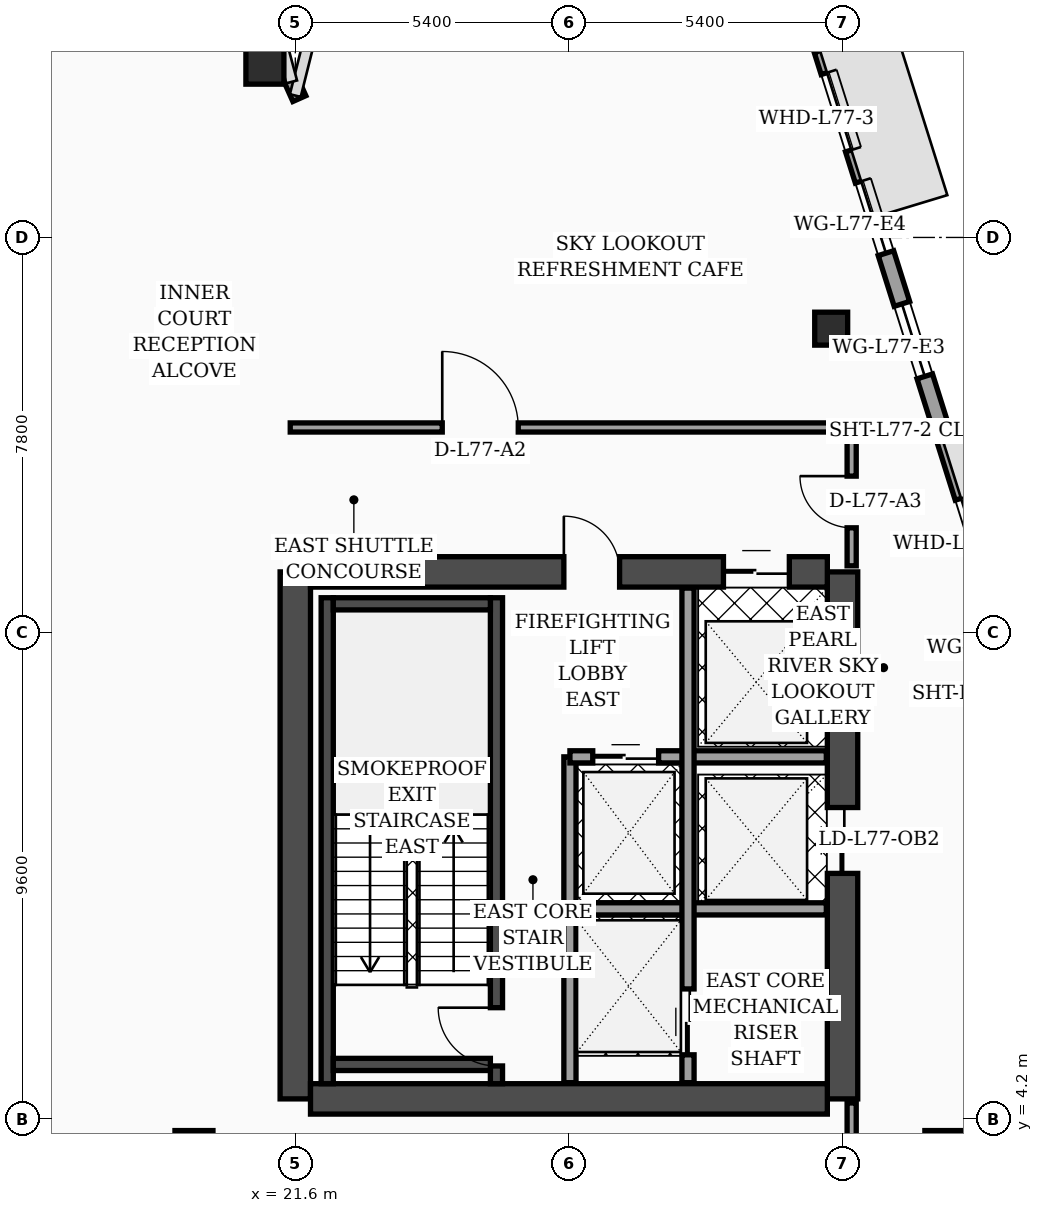
"""IFC4 building model, lengths in metres.
Left out: names, types, materials, properties, quantities, classifications, styles, units other than length and angle.
Written with IfcOpenShell. Run it as: python <this file> out.ifc"""

import sys

from ifc_helpers import new_model, si_unit, direction, frame, frame_2d, origin, origin_2d, place, context, subcontext, project, spatial, rectangle, hollow_rectangle, extrude, element, fill, save


model = new_model("IFC4")
c1 = context("Model", 3, precision=1e-05, world=origin(), true_north=direction((0.0, 1.0)))
c2 = subcontext(c1, "Body", "Model", "MODEL_VIEW")
j1 = project(units=[si_unit("LENGTHUNIT", "METRE"), si_unit("PLANEANGLEUNIT", "RADIAN")], contexts=[c1])
p1 = place(None, origin())
s1 = spatial("IfcSite", under=j1, at=p1, CompositionType="ELEMENT")
p2 = place(p1, origin())
s2 = spatial("IfcBuilding", under=s1, at=p2, CompositionType="ELEMENT")
p3 = place(p2, frame((0.0, 0.0, 311.5)))
s3 = spatial("IfcBuildingStorey", under=s2, at=p3, CompositionType="ELEMENT", Elevation=311.5)
p4 = place(p3, frame((21.6, 4.6, 0.0), z_axis=(0.0, 0.0, 1.0), x_axis=(0.0, 1.0, 0.0)))
e1 = element("IfcWall", 1, at=p4, inside=s3, PredefinedType="SHEAR", context=c2, shape_type="SweptSolid", body=[
    extrude(rectangle(XDim=10.4, YDim=0.6, at=frame_2d((5.2, 0.0))), origin(), (0.0, 0.0, 1.0), 4.26),
])
p5 = place(p3, frame((32.4, 4.6, 0.0), z_axis=(0.0, 0.0, 1.0), x_axis=(0.0, 1.0, 0.0)))
e2 = element("IfcWall", 2, at=p5, inside=s3, PredefinedType="SHEAR", context=c2, shape_type="SweptSolid", body=[
    extrude(rectangle(XDim=10.4, YDim=0.6, at=frame_2d((5.2, 0.0))), origin(), (0.0, 0.0, 1.0), 4.26),
])
p6 = place(p5, frame((4.45, 0.0, 0.0)))
e3 = element("IfcOpeningElement", 3, at=p6, cuts=e2, PredefinedType="OPENING", context=c2, shape_type="SweptSolid", body=[
    extrude(rectangle(XDim=1.3, YDim=2.35, at=frame_2d((0.65, 1.175))), frame((0.0, 0.31, 0.0), z_axis=(0.0, -1.0, 0.0), x_axis=(1.0, 0.0, 0.0)), (0.0, 0.0, 1.0), 0.62),
])
p7 = place(p3, frame((21.9, 15.0, 0.0), z_axis=(0.0, 0.0, 1.0), x_axis=(1.0, 0.0, 0.0)))
e4 = element("IfcWall", 4, at=p7, inside=s3, PredefinedType="SHEAR", context=c2, shape_type="SweptSolid", body=[
    extrude(rectangle(XDim=10.2, YDim=0.6, at=frame_2d((5.1, 0.0))), origin(), (0.0, 0.0, 1.0), 4.26),
])
p8 = place(p7, frame((5.0, 0.0, 0.0)))
e5 = element("IfcOpeningElement", 5, at=p8, cuts=e4, PredefinedType="OPENING", context=c2, shape_type="SweptSolid", body=[
    extrude(rectangle(XDim=1.1, YDim=2.2, at=frame_2d((0.55, 1.1))), frame((0.0, 0.31, 0.0), z_axis=(0.0, -1.0, 0.0), x_axis=(1.0, 0.0, 0.0)), (0.0, 0.0, 1.0), 0.62),
])
p9 = place(p7, frame((8.15, 0.0, 0.0)))
e6 = element("IfcOpeningElement", 6, at=p9, cuts=e4, PredefinedType="OPENING", context=c2, shape_type="SweptSolid", body=[
    extrude(rectangle(XDim=1.3, YDim=2.35, at=frame_2d((0.65, 1.175))), frame((0.0, 0.31, 0.0), z_axis=(0.0, -1.0, 0.0), x_axis=(1.0, 0.0, 0.0)), (0.0, 0.0, 1.0), 0.62),
])
p10 = place(p3, frame((21.9, 4.6, 0.0), z_axis=(0.0, 0.0, 1.0), x_axis=(1.0, 0.0, 0.0)))
e7 = element("IfcWall", 7, at=p10, inside=s3, PredefinedType="SHEAR", context=c2, shape_type="SweptSolid", body=[
    extrude(rectangle(XDim=10.2, YDim=0.6, at=frame_2d((5.1, 0.0))), origin(), (0.0, 0.0, 1.0), 4.26),
])
p11 = place(p3, frame((22.23, 4.9, 0.0), z_axis=(0.0, 0.0, 1.0), x_axis=(0.0, 1.0, 0.0)))
e8 = element("IfcWall", 8, at=p11, inside=s3, PredefinedType="SOLIDWALL", context=c2, shape_type="SweptSolid", body=[
    extrude(rectangle(XDim=9.59, YDim=0.24, at=frame_2d((4.795, 0.0))), origin(), (0.0, 0.0, 1.0), 4.26),
])
p12 = place(p3, frame((25.57, 4.9, 0.0), z_axis=(0.0, 0.0, 1.0), x_axis=(0.0, 1.0, 0.0)))
e9 = element("IfcWall", 9, at=p12, inside=s3, PredefinedType="SOLIDWALL", context=c2, shape_type="SweptSolid", body=[
    extrude(rectangle(XDim=9.59, YDim=0.24, at=frame_2d((4.795, 0.0))), origin(), (0.0, 0.0, 1.0), 4.26),
])
p13 = place(p12, frame((0.35, 0.0, 0.0)))
e10 = element("IfcOpeningElement", 10, at=p13, cuts=e9, PredefinedType="OPENING", context=c2, shape_type="SweptSolid", body=[
    extrude(rectangle(XDim=1.15, YDim=2.2, at=frame_2d((0.575, 1.1))), frame((0.0, 0.13, 0.0), z_axis=(0.0, -1.0, 0.0), x_axis=(1.0, 0.0, 0.0)), (0.0, 0.0, 1.0), 0.26),
])
for number, where, z_axis, x_axis in (
    (11, (22.35, 5.28, 0.0), (0.0, 0.0, 1.0), (1.0, 0.0, 0.0)),
    (12, (22.35, 14.37, 0.0), (0.0, 0.0, 1.0), (1.0, 0.0, 0.0)),
):
    element("IfcWall", number, at=place(p3, frame(where, z_axis=z_axis, x_axis=x_axis)), inside=s3, PredefinedType="SOLIDWALL", context=c2, shape_type="SweptSolid", body=[
        extrude(rectangle(XDim=3.1, YDim=0.24, at=frame_2d((1.55, 0.0))), origin(), (0.0, 0.0, 1.0), 4.26),
    ])
for number, where, z_axis, x_axis in (
    (13, (21.0, 25.0, 0.0), (0.0, 0.0, 1.0), (1.0, 0.0, 0.0)),
    (14, (19.6, 3.6, 0.0), (0.0, 0.0, 1.0), (1.0, 0.0, 0.0)),
    (15, (34.4, 3.6, 0.0), (0.0, 0.0, 1.0), (1.0, 0.0, 0.0)),
):
    element("IfcColumn", number, at=place(p3, frame(where, z_axis=z_axis, x_axis=x_axis)), inside=s3, PredefinedType="COLUMN", context=c2, shape_type="SweptSolid", body=[
        extrude(hollow_rectangle(XDim=0.75, YDim=0.75, WallThickness=0.032, at=origin_2d()), origin(), (0.0, 0.0, 1.0), 4.26),
    ])
p14 = place(p3, frame((32.176, 19.8, 0.0), z_axis=(0.0, 0.0, 1.0), x_axis=(1.0, 0.0, 0.0)))
e16 = element("IfcColumn", 16, at=p14, inside=s3, PredefinedType="COLUMN", context=c2, shape_type="SweptSolid", body=[
    extrude(hollow_rectangle(XDim=0.65, YDim=0.65, WallThickness=0.028, at=origin_2d()), origin(), (0.0, 0.0, 1.0), 4.26),
])
p15 = place(p3, frame((21.68, 24.34, 0.0), z_axis=(0.0, 0.0, 1.0), x_axis=(-0.40758134973, 0.913168901875, 0.0)))
e17 = element("IfcWall", 17, at=p15, inside=s3, PredefinedType="SOLIDWALL", context=c2, shape_type="SweptSolid", body=[
    extrude(rectangle(XDim=0.471, YDim=0.28, at=frame_2d((0.235, 0.0))), origin(), (0.0, 0.0, 1.0), 4.26),
])
p16 = place(p3, frame((38.23, 5.505, 0.0), z_axis=(0.0, 0.0, 1.0), x_axis=(-0.300509063924, 0.953778958931, 0.0)))
e18 = element("IfcWall", 18, at=p16, inside=s3, PredefinedType="SOLIDWALL", context=c2, shape_type="SweptSolid", body=[
    extrude(rectangle(XDim=30.814, YDim=0.32, at=frame_2d((15.407, 0.0))), origin(), (0.0, 0.0, 1.0), 4.26),
])
p17 = place(p16, frame((4.437, 0.0, 0.7)))
e19 = element("IfcOpeningElement", 19, at=p17, cuts=e18, PredefinedType="OPENING", context=c2, shape_type="SweptSolid", body=[
    extrude(rectangle(XDim=1.6, YDim=1.65, at=frame_2d((0.8, 0.825))), frame((0.0, 0.17, 0.0), z_axis=(0.0, -1.0, 0.0), x_axis=(1.0, 0.0, 0.0)), (0.0, 0.0, 1.0), 0.34),
])
p18 = place(p16, frame((9.889, 0.0, 0.7)))
e20 = element("IfcOpeningElement", 20, at=p18, cuts=e18, PredefinedType="OPENING", context=c2, shape_type="SweptSolid", body=[
    extrude(rectangle(XDim=1.6, YDim=1.65, at=frame_2d((0.8, 0.825))), frame((0.0, 0.17, 0.0), z_axis=(0.0, -1.0, 0.0), x_axis=(1.0, 0.0, 0.0)), (0.0, 0.0, 1.0), 0.34),
])
p19 = place(p16, frame((18.696, 0.0, 0.7)))
e21 = element("IfcOpeningElement", 21, at=p19, cuts=e18, PredefinedType="OPENING", context=c2, shape_type="SweptSolid", body=[
    extrude(rectangle(XDim=1.6, YDim=1.65, at=frame_2d((0.8, 0.825))), frame((0.0, 0.17, 0.0), z_axis=(0.0, -1.0, 0.0), x_axis=(1.0, 0.0, 0.0)), (0.0, 0.0, 1.0), 0.34),
])
p20 = place(p16, frame((1.6, 0.0, 0.75)))
e22 = element("IfcOpeningElement", 22, at=p20, cuts=e18, PredefinedType="OPENING", context=c2, shape_type="SweptSolid", body=[
    extrude(rectangle(XDim=1.5, YDim=1.6, at=frame_2d((0.75, 0.8))), frame((0.0, 0.17, 0.0), z_axis=(0.0, -1.0, 0.0), x_axis=(1.0, 0.0, 0.0)), (0.0, 0.0, 1.0), 0.34),
])
p21 = place(p16, frame((7.8, 0.0, 0.75)))
e23 = element("IfcOpeningElement", 23, at=p21, cuts=e18, PredefinedType="OPENING", context=c2, shape_type="SweptSolid", body=[
    extrude(rectangle(XDim=1.5, YDim=1.6, at=frame_2d((0.75, 0.8))), frame((0.0, 0.17, 0.0), z_axis=(0.0, -1.0, 0.0), x_axis=(1.0, 0.0, 0.0)), (0.0, 0.0, 1.0), 0.34),
])
p22 = place(p16, frame((14.0, 0.0, 0.75)))
e24 = element("IfcOpeningElement", 24, at=p22, cuts=e18, PredefinedType="OPENING", context=c2, shape_type="SweptSolid", body=[
    extrude(rectangle(XDim=1.5, YDim=1.6, at=frame_2d((0.75, 0.8))), frame((0.0, 0.17, 0.0), z_axis=(0.0, -1.0, 0.0), x_axis=(1.0, 0.0, 0.0)), (0.0, 0.0, 1.0), 0.34),
])
p23 = place(p16, frame((16.55, 0.0, 0.75)))
e25 = element("IfcOpeningElement", 25, at=p23, cuts=e18, PredefinedType="OPENING", context=c2, shape_type="SweptSolid", body=[
    extrude(rectangle(XDim=1.5, YDim=1.6, at=frame_2d((0.75, 0.8))), frame((0.0, 0.17, 0.0), z_axis=(0.0, -1.0, 0.0), x_axis=(1.0, 0.0, 0.0)), (0.0, 0.0, 1.0), 0.34),
])
p24 = place(p16, frame((20.75, 0.0, 0.75)))
e26 = element("IfcOpeningElement", 26, at=p24, cuts=e18, PredefinedType="OPENING", context=c2, shape_type="SweptSolid", body=[
    extrude(rectangle(XDim=1.5, YDim=1.6, at=frame_2d((0.75, 0.8))), frame((0.0, 0.17, 0.0), z_axis=(0.0, -1.0, 0.0), x_axis=(1.0, 0.0, 0.0)), (0.0, 0.0, 1.0), 0.34),
])
p25 = place(p16, frame((23.3, 0.0, 0.75)))
e27 = element("IfcOpeningElement", 27, at=p25, cuts=e18, PredefinedType="OPENING", context=c2, shape_type="SweptSolid", body=[
    extrude(rectangle(XDim=1.5, YDim=1.6, at=frame_2d((0.75, 0.8))), frame((0.0, 0.17, 0.0), z_axis=(0.0, -1.0, 0.0), x_axis=(1.0, 0.0, 0.0)), (0.0, 0.0, 1.0), 0.34),
])
p26 = place(p16, frame((26.4, 0.0, 0.75)))
e28 = element("IfcOpeningElement", 28, at=p26, cuts=e18, PredefinedType="OPENING", context=c2, shape_type="SweptSolid", body=[
    extrude(rectangle(XDim=1.5, YDim=1.6, at=frame_2d((0.75, 0.8))), frame((0.0, 0.17, 0.0), z_axis=(0.0, -1.0, 0.0), x_axis=(1.0, 0.0, 0.0)), (0.0, 0.0, 1.0), 0.34),
])
p27 = place(p3, frame((27.02, 4.92, 0.0), z_axis=(0.0, 0.0, 1.0), x_axis=(0.0, 1.0, 0.0)))
e29 = element("IfcWall", 29, at=p27, inside=s3, PredefinedType="SOLIDWALL", context=c2, shape_type="SweptSolid", body=[
    extrude(rectangle(XDim=6.43, YDim=0.24, at=frame_2d((3.215, 0.0))), origin(), (0.0, 0.0, 1.0), 4.26),
])
p28 = place(p3, frame((27.02, 11.35, 0.0), z_axis=(0.0, 0.0, 1.0), x_axis=(1.0, 0.0, 0.0)))
e30 = element("IfcWall", 30, at=p28, inside=s3, PredefinedType="SOLIDWALL", context=c2, shape_type="SweptSolid", body=[
    extrude(rectangle(XDim=5.06, YDim=0.24, at=frame_2d((2.53, 0.0))), origin(), (0.0, 0.0, 1.0), 4.26),
])
p29 = place(p28, frame((0.45, 0.0, 0.0)))
e31 = element("IfcOpeningElement", 31, at=p29, cuts=e30, PredefinedType="OPENING", context=c2, shape_type="SweptSolid", body=[
    extrude(rectangle(XDim=1.3, YDim=2.35, at=frame_2d((0.65, 1.175))), frame((0.0, 0.13, 0.0), z_axis=(0.0, -1.0, 0.0), x_axis=(1.0, 0.0, 0.0)), (0.0, 0.0, 1.0), 0.26),
])
p30 = place(p3, frame((27.02, 8.35, 0.0), z_axis=(0.0, 0.0, 1.0), x_axis=(1.0, 0.0, 0.0)))
e32 = element("IfcWall", 32, at=p30, inside=s3, PredefinedType="SOLIDWALL", context=c2, shape_type="SweptSolid", body=[
    extrude(rectangle(XDim=5.06, YDim=0.24, at=frame_2d((2.53, 0.0))), origin(), (0.0, 0.0, 1.0), 4.26),
])
p31 = place(p3, frame((29.35, 4.92, 0.0), z_axis=(0.0, 0.0, 1.0), x_axis=(0.0, 1.0, 0.0)))
e33 = element("IfcWall", 33, at=p31, inside=s3, PredefinedType="SOLIDWALL", context=c2, shape_type="SweptSolid", body=[
    extrude(rectangle(XDim=9.76, YDim=0.24, at=frame_2d((4.88, 0.0))), origin(), (0.0, 0.0, 1.0), 4.26),
])
p32 = place(p31, frame((0.55, 0.0, 0.0)))
e34 = element("IfcOpeningElement", 34, at=p32, cuts=e33, PredefinedType="OPENING", context=c2, shape_type="SweptSolid", body=[
    extrude(rectangle(XDim=1.3, YDim=2.35, at=frame_2d((0.65, 1.175))), frame((0.0, 0.13, 0.0), z_axis=(0.0, -1.0, 0.0), x_axis=(1.0, 0.0, 0.0)), (0.0, 0.0, 1.0), 0.26),
])
p33 = place(p3, frame((21.5, 17.85, 0.0), z_axis=(0.0, 0.0, 1.0), x_axis=(1.0, 0.0, 0.0)))
e35 = element("IfcWall", 35, at=p33, inside=s3, PredefinedType="PARTITIONING", context=c2, shape_type="SweptSolid", body=[
    extrude(rectangle(XDim=12.78, YDim=0.18, at=frame_2d((6.39, 0.0))), origin(), (0.0, 0.0, 1.0), 3.69),
])
p34 = place(p33, frame((3.0, 0.0, 0.0)))
e36 = element("IfcOpeningElement", 36, at=p34, cuts=e35, PredefinedType="OPENING", context=c2, shape_type="SweptSolid", body=[
    extrude(rectangle(XDim=1.5, YDim=2.22, at=frame_2d((0.75, 1.11))), frame((0.0, 0.1, 0.0), z_axis=(0.0, -1.0, 0.0), x_axis=(1.0, 0.0, 0.0)), (0.0, 0.0, 1.0), 0.2),
])
p35 = place(p3, frame((32.58, 15.12, 0.0), z_axis=(0.0, 0.0, 1.0), x_axis=(0.0, 1.0, 0.0)))
e37 = element("IfcWall", 37, at=p35, inside=s3, PredefinedType="PARTITIONING", context=c2, shape_type="SweptSolid", body=[
    extrude(rectangle(XDim=2.66, YDim=0.18, at=frame_2d((1.33, 0.0))), origin(), (0.0, 0.0, 1.0), 3.69),
])
p36 = place(p35, frame((0.75, 0.0, 0.0)))
e38 = element("IfcOpeningElement", 38, at=p36, cuts=e37, PredefinedType="OPENING", context=c2, shape_type="SweptSolid", body=[
    extrude(rectangle(XDim=1.02, YDim=2.2, at=frame_2d((0.51, 1.1))), frame((0.0, 0.1, 0.0), z_axis=(0.0, -1.0, 0.0), x_axis=(1.0, 0.0, 0.0)), (0.0, 0.0, 1.0), 0.2),
])
p37 = place(p3, frame((32.58, 2.6, 0.0), z_axis=(0.0, 0.0, 1.0), x_axis=(0.0, 1.0, 0.0)))
e39 = element("IfcWall", 39, at=p37, inside=s3, PredefinedType="PARTITIONING", context=c2, shape_type="SweptSolid", body=[
    extrude(rectangle(XDim=1.92, YDim=0.18, at=frame_2d((0.96, 0.0))), origin(), (0.0, 0.0, 1.0), 3.69),
])
p38 = place(p18, origin())
e40 = element("IfcWindow", 40, at=p38, inside=s3, PartitioningType="SINGLE_PANEL", PredefinedType="WINDOW", context=c2, shape_type="SweptSolid", body=[
    extrude(rectangle(XDim=1.6, YDim=1.65, at=frame_2d((0.8, 0.825))), frame((0.0, 0.03, 0.0), z_axis=(0.0, -1.0, 0.0), x_axis=(1.0, 0.0, 0.0)), (0.0, 0.0, 1.0), 0.06),
])
fill(e20, e40)
p39 = place(p19, origin())
e41 = element("IfcWindow", 41, at=p39, inside=s3, PartitioningType="SINGLE_PANEL", PredefinedType="WINDOW", context=c2, shape_type="SweptSolid", body=[
    extrude(rectangle(XDim=1.6, YDim=1.65, at=frame_2d((0.8, 0.825))), frame((0.0, 0.03, 0.0), z_axis=(0.0, -1.0, 0.0), x_axis=(1.0, 0.0, 0.0)), (0.0, 0.0, 1.0), 0.06),
])
fill(e21, e41)
p40 = place(p22, origin())
e42 = element("IfcWindow", 42, at=p40, inside=s3, PartitioningType="SINGLE_PANEL", PredefinedType="WINDOW", context=c2, shape_type="SweptSolid", body=[
    extrude(rectangle(XDim=1.5, YDim=1.6, at=frame_2d((0.75, 0.8))), frame((0.0, 0.03, 0.0), z_axis=(0.0, -1.0, 0.0), x_axis=(1.0, 0.0, 0.0)), (0.0, 0.0, 1.0), 0.06),
])
fill(e24, e42)
p41 = place(p23, origin())
e43 = element("IfcWindow", 43, at=p41, inside=s3, PartitioningType="SINGLE_PANEL", PredefinedType="WINDOW", context=c2, shape_type="SweptSolid", body=[
    extrude(rectangle(XDim=1.5, YDim=1.6, at=frame_2d((0.75, 0.8))), frame((0.0, 0.03, 0.0), z_axis=(0.0, -1.0, 0.0), x_axis=(1.0, 0.0, 0.0)), (0.0, 0.0, 1.0), 0.06),
])
fill(e25, e43)
p42 = place(p29, origin())
e44 = element("IfcDoor", 44, at=p42, inside=s3, OperationType="DOUBLE_DOOR_SLIDING", PredefinedType="DOOR", context=c2, shape_type="SweptSolid", body=[
    extrude(rectangle(XDim=1.3, YDim=2.35, at=frame_2d((0.65, 1.175))), frame((0.0, 0.025, 0.0), z_axis=(0.0, -1.0, 0.0), x_axis=(1.0, 0.0, 0.0)), (0.0, 0.0, 1.0), 0.05),
])
fill(e31, e44)
p43 = place(p32, origin())
e45 = element("IfcDoor", 45, at=p43, inside=s3, OperationType="DOUBLE_DOOR_SLIDING", PredefinedType="DOOR", context=c2, shape_type="SweptSolid", body=[
    extrude(rectangle(XDim=1.3, YDim=2.35, at=frame_2d((0.65, 1.175))), frame((0.0, 0.025, 0.0), z_axis=(0.0, -1.0, 0.0), x_axis=(1.0, 0.0, 0.0)), (0.0, 0.0, 1.0), 0.05),
])
fill(e34, e45)
p44 = place(p34, origin())
e46 = element("IfcDoor", 46, at=p44, inside=s3, OperationType="SINGLE_SWING_LEFT", PredefinedType="DOOR", context=c2, shape_type="SweptSolid", body=[
    extrude(rectangle(XDim=1.5, YDim=2.22, at=frame_2d((0.75, 1.11))), frame((0.0, 0.025, 0.0), z_axis=(0.0, -1.0, 0.0), x_axis=(1.0, 0.0, 0.0)), (0.0, 0.0, 1.0), 0.05),
])
fill(e36, e46)
p45 = place(p36, origin())
e47 = element("IfcDoor", 47, at=p45, inside=s3, OperationType="SINGLE_SWING_RIGHT", PredefinedType="DOOR", context=c2, shape_type="SweptSolid", body=[
    extrude(rectangle(XDim=1.02, YDim=2.2, at=frame_2d((0.51, 1.1))), frame((0.0, 0.025, 0.0), z_axis=(0.0, -1.0, 0.0), x_axis=(1.0, 0.0, 0.0)), (0.0, 0.0, 1.0), 0.05),
])
fill(e38, e47)
p46 = place(p13, origin())
e48 = element("IfcDoor", 48, at=p46, inside=s3, OperationType="SINGLE_SWING_RIGHT", PredefinedType="DOOR", context=c2, shape_type="SweptSolid", body=[
    extrude(rectangle(XDim=1.15, YDim=2.2, at=frame_2d((0.575, 1.1))), frame((0.0, 0.025, 0.0), z_axis=(0.0, -1.0, 0.0), x_axis=(1.0, 0.0, 0.0)), (0.0, 0.0, 1.0), 0.05),
])
fill(e10, e48)
p47 = place(p8, origin())
e49 = element("IfcDoor", 49, at=p47, inside=s3, OperationType="SINGLE_SWING_LEFT", PredefinedType="DOOR", context=c2, shape_type="SweptSolid", body=[
    extrude(rectangle(XDim=1.1, YDim=2.2, at=frame_2d((0.55, 1.1))), frame((0.0, 0.025, 0.0), z_axis=(0.0, -1.0, 0.0), x_axis=(1.0, 0.0, 0.0)), (0.0, 0.0, 1.0), 0.05),
])
fill(e5, e49)
p48 = place(p9, origin())
e50 = element("IfcDoor", 50, at=p48, inside=s3, OperationType="DOUBLE_DOOR_SLIDING", PredefinedType="DOOR", context=c2, shape_type="SweptSolid", body=[
    extrude(rectangle(XDim=1.3, YDim=2.35, at=frame_2d((0.65, 1.175))), frame((0.0, 0.025, 0.0), z_axis=(0.0, -1.0, 0.0), x_axis=(1.0, 0.0, 0.0)), (0.0, 0.0, 1.0), 0.05),
])
fill(e6, e50)
p49 = place(p6, origin())
e51 = element("IfcDoor", 51, at=p49, inside=s3, OperationType="DOUBLE_DOOR_SLIDING", PredefinedType="DOOR", context=c2, shape_type="SweptSolid", body=[
    extrude(rectangle(XDim=1.3, YDim=2.35, at=frame_2d((0.65, 1.175))), frame((0.0, 0.025, 0.0), z_axis=(0.0, -1.0, 0.0), x_axis=(1.0, 0.0, 0.0)), (0.0, 0.0, 1.0), 0.05),
])
fill(e3, e51)
save(model, sys.argv[1])
